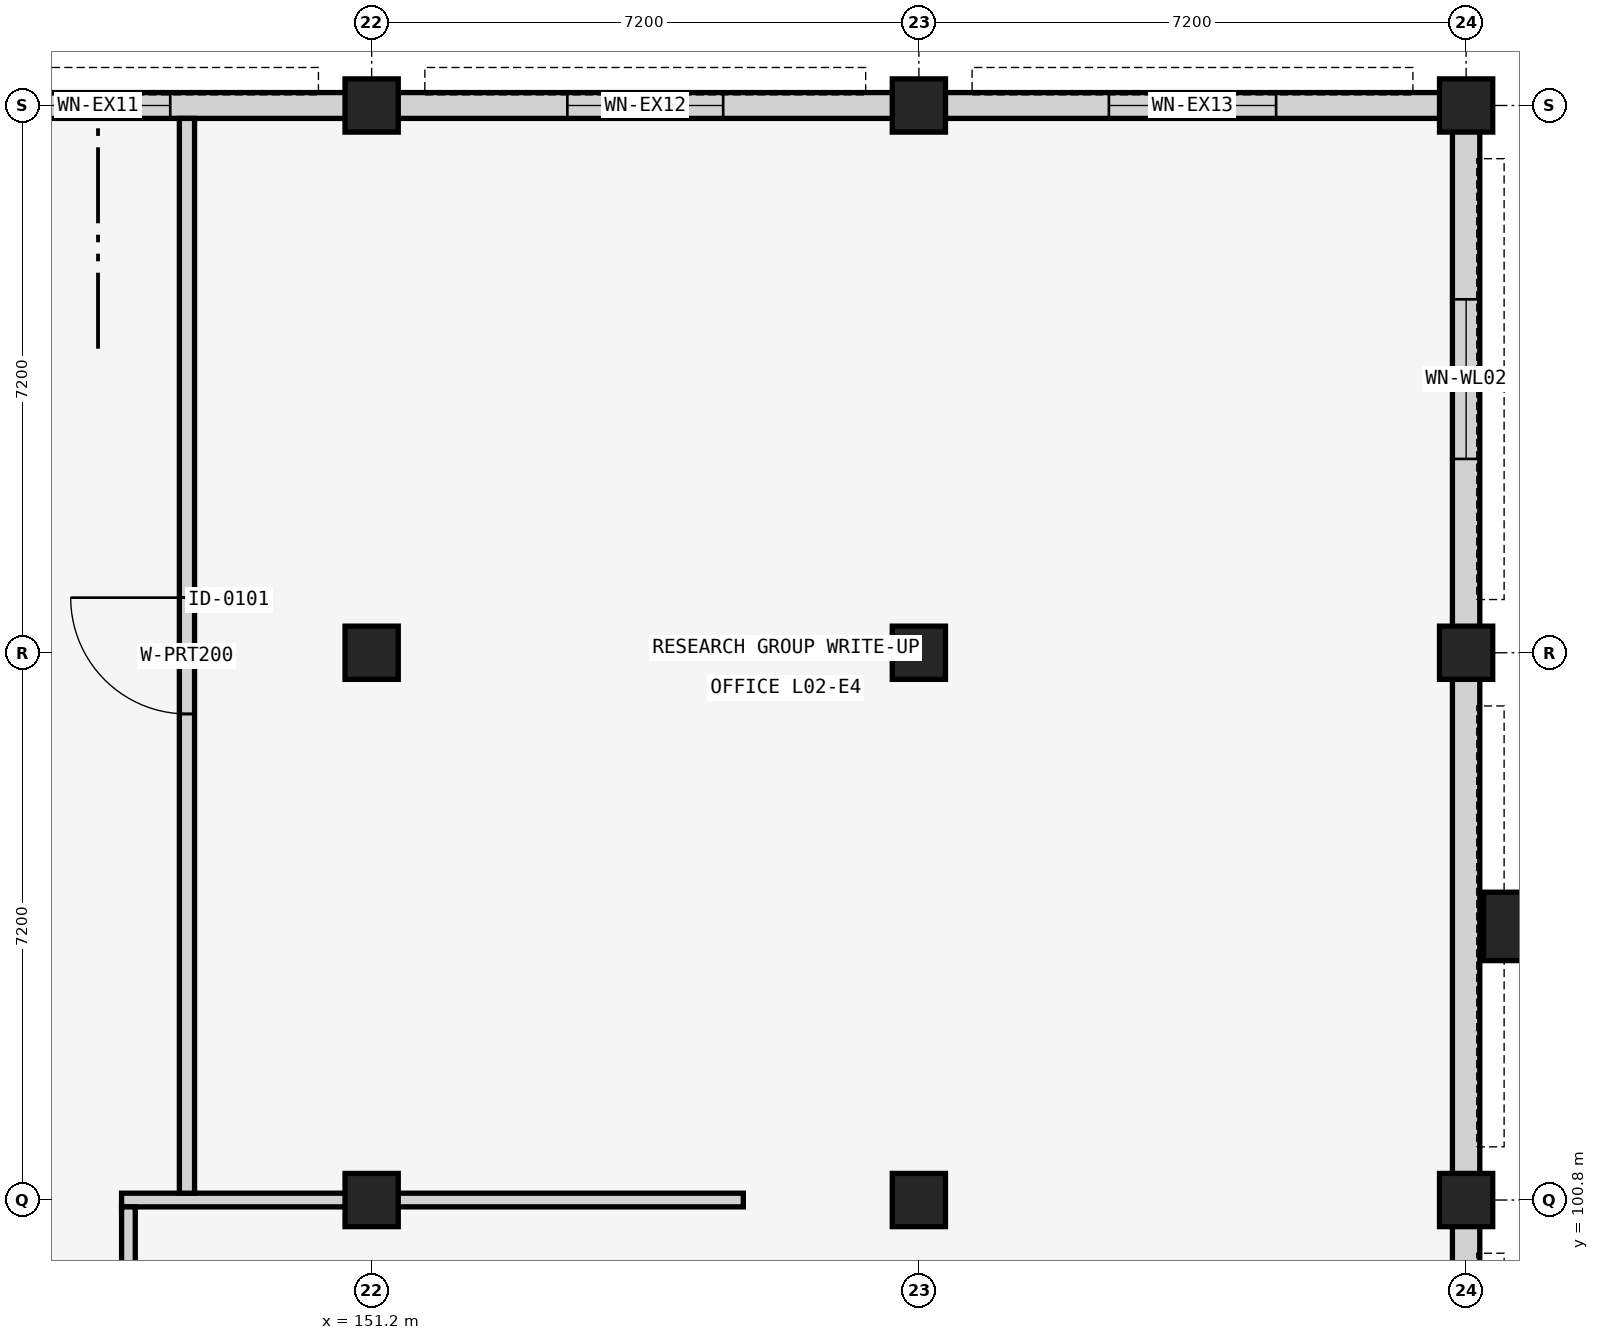
"""IFC4 building model, lengths in metres.
Left out: names, types, materials, properties, quantities, classifications, styles, units other than length and angle.
Written with IfcOpenShell. Run it as: python <this file> out.ifc"""

import sys

from ifc_helpers import new_model, si_unit, direction, frame, frame_2d, origin, origin_2d, place, context, subcontext, project, spatial, rectangle, extrude, element, fill, save


model = new_model("IFC4")
c1 = context("Model", 3, precision=1e-05, world=origin(), true_north=direction((0.0, 1.0)))
c2 = subcontext(c1, "Body", "Model", "MODEL_VIEW")
j1 = project(units=[si_unit("LENGTHUNIT", "METRE"), si_unit("PLANEANGLEUNIT", "RADIAN")], contexts=[c1])
p1 = place(None, origin())
s1 = spatial("IfcSite", under=j1, at=p1, CompositionType="ELEMENT")
p2 = place(p1, origin())
s2 = spatial("IfcBuilding", under=s1, at=p2, CompositionType="ELEMENT")
p3 = place(p2, frame((0.0, 0.0, 8.96)))
s3 = spatial("IfcBuildingStorey", under=s2, at=p3, CompositionType="ELEMENT", Elevation=8.96)
for number, where, z_axis, x_axis in (
    (1, (151.2, 100.8, 0.0), (0.0, 0.0, 1.0), (1.0, 0.0, 0.0)),
    (2, (151.2, 108.0, 0.0), (0.0, 0.0, 1.0), (1.0, 0.0, 0.0)),
    (3, (151.2, 115.2, 0.0), (0.0, 0.0, 1.0), (1.0, 0.0, 0.0)),
    (4, (158.4, 100.8, 0.0), (0.0, 0.0, 1.0), (1.0, 0.0, 0.0)),
    (5, (158.4, 108.0, 0.0), (0.0, 0.0, 1.0), (1.0, 0.0, 0.0)),
    (6, (158.4, 115.2, 0.0), (0.0, 0.0, 1.0), (1.0, 0.0, 0.0)),
    (7, (165.6, 100.8, 0.0), (0.0, 0.0, 1.0), (1.0, 0.0, 0.0)),
    (8, (165.6, 108.0, 0.0), (0.0, 0.0, 1.0), (1.0, 0.0, 0.0)),
    (9, (165.6, 115.2, 0.0), (0.0, 0.0, 1.0), (1.0, 0.0, 0.0)),
):
    element("IfcColumn", number, at=place(p3, frame(where, z_axis=z_axis, x_axis=x_axis)), inside=s3, PredefinedType="COLUMN", context=c2, shape_type="SweptSolid", body=[
        extrude(rectangle(XDim=0.7, YDim=0.7, at=origin_2d()), origin(), (0.0, 0.0, 1.0), 4.16),
    ])
p4 = place(p3, frame((166.08, 104.4, 0.0), z_axis=(0.0, 0.0, 1.0), x_axis=(1.0, 0.0, 0.0)))
e10 = element("IfcColumn", 10, at=p4, inside=s3, PredefinedType="PILASTER", context=c2, shape_type="SweptSolid", body=[
    extrude(rectangle(XDim=0.5, YDim=0.9, at=origin_2d()), origin(), (0.0, 0.0, 1.0), 4.16),
])
p5 = place(p3, frame((165.6, 93.94, 0.0), z_axis=(0.0, 0.0, 1.0), x_axis=(0.0, 1.0, 0.0)))
e11 = element("IfcWall", 11, at=p5, inside=s3, PredefinedType="SOLIDWALL", context=c2, shape_type="SweptSolid", body=[
    extrude(rectangle(XDim=6.52, YDim=0.36, at=frame_2d((3.26, 0.0))), origin(), (0.0, 0.0, 1.0), 3.21),
])
p6 = place(p5, frame((1.835, 0.0, 0.95)))
e12 = element("IfcOpeningElement", 12, at=p6, cuts=e11, PredefinedType="OPENING", context=c2, shape_type="SweptSolid", body=[
    extrude(rectangle(XDim=2.85, YDim=1.95, at=frame_2d((1.425, 0.975))), frame((0.0, 0.19, 0.0), z_axis=(0.0, -1.0, 0.0), x_axis=(1.0, 0.0, 0.0)), (0.0, 0.0, 1.0), 0.38),
])
p7 = place(p3, frame((165.6, 101.14, 0.0), z_axis=(0.0, 0.0, 1.0), x_axis=(0.0, 1.0, 0.0)))
e13 = element("IfcWall", 13, at=p7, inside=s3, PredefinedType="SOLIDWALL", context=c2, shape_type="SweptSolid", body=[
    extrude(rectangle(XDim=6.52, YDim=0.36, at=frame_2d((3.26, 0.0))), origin(), (0.0, 0.0, 1.0), 3.21),
])
p8 = place(p3, frame((165.6, 108.34, 0.0), z_axis=(0.0, 0.0, 1.0), x_axis=(0.0, 1.0, 0.0)))
e14 = element("IfcWall", 14, at=p8, inside=s3, PredefinedType="SOLIDWALL", context=c2, shape_type="SweptSolid", body=[
    extrude(rectangle(XDim=6.52, YDim=0.36, at=frame_2d((3.26, 0.0))), origin(), (0.0, 0.0, 1.0), 3.21),
])
p9 = place(p8, frame((2.21, 0.0, 0.95)))
e15 = element("IfcOpeningElement", 15, at=p9, cuts=e14, PredefinedType="OPENING", context=c2, shape_type="SweptSolid", body=[
    extrude(rectangle(XDim=2.1, YDim=2.1, at=frame_2d((1.05, 1.05))), frame((0.0, 0.19, 0.0), z_axis=(0.0, -1.0, 0.0), x_axis=(1.0, 0.0, 0.0)), (0.0, 0.0, 1.0), 0.38),
])
p10 = place(p3, frame((144.34, 115.2, 0.0), z_axis=(0.0, 0.0, 1.0), x_axis=(1.0, 0.0, 0.0)))
e16 = element("IfcWall", 16, at=p10, inside=s3, PredefinedType="SOLIDWALL", context=c2, shape_type="SweptSolid", body=[
    extrude(rectangle(XDim=6.52, YDim=0.34, at=frame_2d((3.26, 0.0))), origin(), (0.0, 0.0, 1.0), 3.21),
])
p11 = place(p10, frame((2.31, 0.0, 0.95)))
e17 = element("IfcOpeningElement", 17, at=p11, cuts=e16, PredefinedType="OPENING", context=c2, shape_type="SweptSolid", body=[
    extrude(rectangle(XDim=1.9, YDim=1.7, at=frame_2d((0.95, 0.85))), frame((0.0, 0.18, 0.0), z_axis=(0.0, -1.0, 0.0), x_axis=(1.0, 0.0, 0.0)), (0.0, 0.0, 1.0), 0.36),
])
p12 = place(p3, frame((151.54, 115.2, 0.0), z_axis=(0.0, 0.0, 1.0), x_axis=(1.0, 0.0, 0.0)))
e18 = element("IfcWall", 18, at=p12, inside=s3, PredefinedType="SOLIDWALL", context=c2, shape_type="SweptSolid", body=[
    extrude(rectangle(XDim=6.52, YDim=0.34, at=frame_2d((3.26, 0.0))), origin(), (0.0, 0.0, 1.0), 3.21),
])
p13 = place(p12, frame((2.235, 0.0, 0.95)))
e19 = element("IfcOpeningElement", 19, at=p13, cuts=e18, PredefinedType="OPENING", context=c2, shape_type="SweptSolid", body=[
    extrude(rectangle(XDim=2.05, YDim=1.7, at=frame_2d((1.025, 0.85))), frame((0.0, 0.18, 0.0), z_axis=(0.0, -1.0, 0.0), x_axis=(1.0, 0.0, 0.0)), (0.0, 0.0, 1.0), 0.36),
])
p14 = place(p3, frame((158.74, 115.2, 0.0), z_axis=(0.0, 0.0, 1.0), x_axis=(1.0, 0.0, 0.0)))
e20 = element("IfcWall", 20, at=p14, inside=s3, PredefinedType="SOLIDWALL", context=c2, shape_type="SweptSolid", body=[
    extrude(rectangle(XDim=6.52, YDim=0.34, at=frame_2d((3.26, 0.0))), origin(), (0.0, 0.0, 1.0), 3.21),
])
p15 = place(p14, frame((2.16, 0.0, 0.95)))
e21 = element("IfcOpeningElement", 21, at=p15, cuts=e20, PredefinedType="OPENING", context=c2, shape_type="SweptSolid", body=[
    extrude(rectangle(XDim=2.2, YDim=1.6, at=frame_2d((1.1, 0.8))), frame((0.0, 0.18, 0.0), z_axis=(0.0, -1.0, 0.0), x_axis=(1.0, 0.0, 0.0)), (0.0, 0.0, 1.0), 0.36),
])
p16 = place(p3, frame((147.91, 100.8, 0.0), z_axis=(0.0, 0.0, 1.0), x_axis=(1.0, 0.0, 0.0)))
e22 = element("IfcWall", 22, at=p16, inside=s3, PredefinedType="PARTITIONING", context=c2, shape_type="SweptSolid", body=[
    extrude(rectangle(XDim=8.18, YDim=0.18, at=frame_2d((4.09, 0.0))), origin(), (0.0, 0.0, 1.0), 3.16),
])
p17 = place(p3, frame((148.0, 71.89, 0.0), z_axis=(0.0, 0.0, 1.0), x_axis=(0.0, 1.0, 0.0)))
e23 = element("IfcWall", 23, at=p17, inside=s3, PredefinedType="PARTITIONING", context=c2, shape_type="SweptSolid", body=[
    extrude(rectangle(XDim=28.82, YDim=0.18, at=frame_2d((14.41, 0.0))), origin(), (0.0, 0.0, 1.0), 3.16),
])
p18 = place(p17, frame((13.67, 0.0, 0.0)))
e24 = element("IfcOpeningElement", 24, at=p18, cuts=e23, PredefinedType="OPENING", context=c2, shape_type="SweptSolid", body=[
    extrude(rectangle(XDim=1.48, YDim=2.18, at=frame_2d((0.74, 1.09))), frame((0.0, 0.1, 0.0), z_axis=(0.0, -1.0, 0.0), x_axis=(1.0, 0.0, 0.0)), (0.0, 0.0, 1.0), 0.2),
])
p19 = place(p3, frame((148.77, 100.89, 0.0), z_axis=(0.0, 0.0, 1.0), x_axis=(0.0, 1.0, 0.0)))
e25 = element("IfcWall", 25, at=p19, inside=s3, PredefinedType="PARTITIONING", context=c2, shape_type="SweptSolid", body=[
    extrude(rectangle(XDim=14.14, YDim=0.2, at=frame_2d((7.07, 0.0))), origin(), (0.0, 0.0, 1.0), 3.16),
])
p20 = place(p19, frame((6.305, 0.0, 0.0)))
e26 = element("IfcOpeningElement", 26, at=p20, cuts=e25, PredefinedType="OPENING", context=c2, shape_type="SweptSolid", body=[
    extrude(rectangle(XDim=1.53, YDim=2.18, at=frame_2d((0.765, 1.09))), frame((0.0, 0.11, 0.0), z_axis=(0.0, -1.0, 0.0), x_axis=(1.0, 0.0, 0.0)), (0.0, 0.0, 1.0), 0.22),
])
p21 = place(p9, origin())
e27 = element("IfcWindow", 27, at=p21, inside=s3, PartitioningType="SINGLE_PANEL", PredefinedType="WINDOW", context=c2, shape_type="SweptSolid", body=[
    extrude(rectangle(XDim=2.1, YDim=2.1, at=frame_2d((1.05, 1.05))), frame((0.0, 0.03, 0.0), z_axis=(0.0, -1.0, 0.0), x_axis=(1.0, 0.0, 0.0)), (0.0, 0.0, 1.0), 0.06),
])
fill(e15, e27)
p22 = place(p11, origin())
e28 = element("IfcWindow", 28, at=p22, inside=s3, PartitioningType="SINGLE_PANEL", PredefinedType="WINDOW", context=c2, shape_type="SweptSolid", body=[
    extrude(rectangle(XDim=1.9, YDim=1.7, at=frame_2d((0.95, 0.85))), frame((0.0, 0.03, 0.0), z_axis=(0.0, -1.0, 0.0), x_axis=(1.0, 0.0, 0.0)), (0.0, 0.0, 1.0), 0.06),
])
fill(e17, e28)
p23 = place(p13, origin())
e29 = element("IfcWindow", 29, at=p23, inside=s3, PartitioningType="SINGLE_PANEL", PredefinedType="WINDOW", context=c2, shape_type="SweptSolid", body=[
    extrude(rectangle(XDim=2.05, YDim=1.7, at=frame_2d((1.025, 0.85))), frame((0.0, 0.03, 0.0), z_axis=(0.0, -1.0, 0.0), x_axis=(1.0, 0.0, 0.0)), (0.0, 0.0, 1.0), 0.06),
])
fill(e19, e29)
p24 = place(p15, origin())
e30 = element("IfcWindow", 30, at=p24, inside=s3, PartitioningType="SINGLE_PANEL", PredefinedType="WINDOW", context=c2, shape_type="SweptSolid", body=[
    extrude(rectangle(XDim=2.2, YDim=1.6, at=frame_2d((1.1, 0.8))), frame((0.0, 0.03, 0.0), z_axis=(0.0, -1.0, 0.0), x_axis=(1.0, 0.0, 0.0)), (0.0, 0.0, 1.0), 0.06),
])
fill(e21, e30)
p25 = place(p20, origin())
e31 = element("IfcDoor", 31, at=p25, inside=s3, OperationType="SINGLE_SWING_RIGHT", PredefinedType="DOOR", context=c2, shape_type="SweptSolid", body=[
    extrude(rectangle(XDim=1.53, YDim=2.18, at=frame_2d((0.765, 1.09))), frame((0.0, 0.025, 0.0), z_axis=(0.0, -1.0, 0.0), x_axis=(1.0, 0.0, 0.0)), (0.0, 0.0, 1.0), 0.05),
])
fill(e26, e31)
save(model, sys.argv[1])
